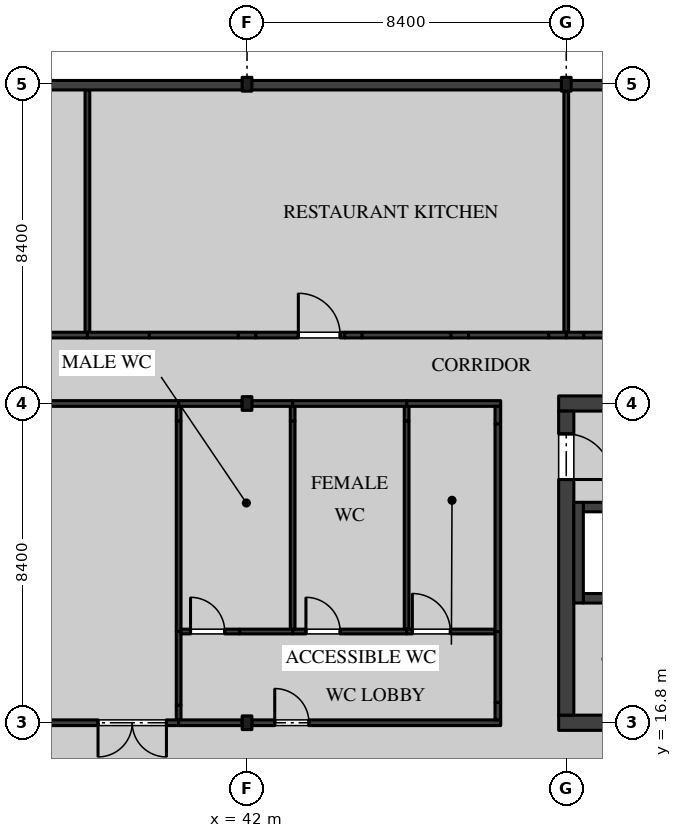
"""IFC4 building model, lengths in metres.
Left out: names, types, materials, properties, quantities, classifications, styles, units other than length and angle.
Written with IfcOpenShell. Run it as: python <this file> out.ifc"""

import sys

from ifc_helpers import new_model, si_unit, direction, frame, frame_2d, origin, origin_2d, place, context, subcontext, project, spatial, rectangle, i_section, extrude, element, fill, save


model = new_model("IFC4")
c1 = context("Model", 3, precision=1e-05, world=origin(), true_north=direction((0.0, 1.0)))
c2 = subcontext(c1, "Body", "Model", "MODEL_VIEW")
j1 = project(units=[si_unit("LENGTHUNIT", "METRE"), si_unit("PLANEANGLEUNIT", "RADIAN")], contexts=[c1])
p1 = place(None, origin())
s1 = spatial("IfcSite", under=j1, at=p1, CompositionType="ELEMENT")
p2 = place(p1, origin())
s2 = spatial("IfcBuilding", under=s1, at=p2, CompositionType="ELEMENT")
p3 = place(p2, frame((0.0, 0.0, 14.4)))
s3 = spatial("IfcBuildingStorey", under=s2, at=p3, CompositionType="ELEMENT", Elevation=14.4)
for number, where, z_axis, x_axis in (
    (1, (42.0, 16.8, 0.0), (0.0, 0.0, 1.0), (1.0, 0.0, 0.0)),
    (2, (42.0, 25.2, 0.0), (0.0, 0.0, 1.0), (1.0, 0.0, 0.0)),
):
    element("IfcColumn", number, at=place(p3, frame(where, z_axis=z_axis, x_axis=x_axis)), inside=s3, PredefinedType="COLUMN", context=c2, shape_type="SweptSolid", body=[
        extrude(i_section(OverallWidth=0.257, OverallDepth=0.361, WebThickness=0.011, FlangeThickness=0.02, FilletRadius=0.015, at=origin_2d()), origin(), (0.0, 0.0, 1.0), 4.37),
    ])
for number, where, z_axis, x_axis in (
    (3, (42.0, 33.6, 0.0), (0.0, 0.0, 1.0), (1.0, 0.0, 0.0)),
    (4, (50.4, 33.6, 0.0), (0.0, 0.0, 1.0), (1.0, 0.0, 0.0)),
):
    element("IfcColumn", number, at=place(p3, frame(where, z_axis=z_axis, x_axis=x_axis)), inside=s3, PredefinedType="COLUMN", context=c2, shape_type="SweptSolid", body=[
        extrude(i_section(OverallWidth=0.257, OverallDepth=0.363, WebThickness=0.013, FlangeThickness=0.022, FilletRadius=0.015, at=origin_2d()), origin(), (0.0, 0.0, 1.0), 4.37),
    ])
for number, where, z_axis, x_axis in (
    (5, (50.2, 16.8, 0.0), (0.0, 0.0, 1.0), (1.0, 0.0, 0.0)),
    (6, (50.2, 25.2, 0.0), (0.0, 0.0, 1.0), (1.0, 0.0, 0.0)),
):
    element("IfcWall", number, at=place(p3, frame(where, z_axis=z_axis, x_axis=x_axis)), inside=s3, PredefinedType="SHEAR", context=c2, shape_type="SweptSolid", body=[
        extrude(rectangle(XDim=8.8, YDim=0.4, at=frame_2d((4.4, 0.0))), origin(), (0.0, 0.0, 1.0), 4.37),
    ])
p4 = place(p3, frame((50.4, 17.0, 0.0), z_axis=(0.0, 0.0, 1.0), x_axis=(0.0, 1.0, 0.0)))
e7 = element("IfcWall", 7, at=p4, inside=s3, PredefinedType="SHEAR", context=c2, shape_type="SweptSolid", body=[
    extrude(rectangle(XDim=8.0, YDim=0.4, at=frame_2d((4.0, 0.0))), origin(), (0.0, 0.0, 1.0), 4.37),
])
p5 = place(p4, frame((6.2, 0.0, 0.0)))
e8 = element("IfcOpeningElement", 8, at=p5, cuts=e7, PredefinedType="OPENING", context=c2, shape_type="SweptSolid", body=[
    extrude(rectangle(XDim=1.2, YDim=2.1, at=frame_2d((0.6, 1.05))), frame((0.0, 0.21, 0.0), z_axis=(0.0, -1.0, 0.0), x_axis=(1.0, 0.0, 0.0)), (0.0, 0.0, 1.0), 0.42),
])
for number, where, z_axis, x_axis in (
    (9, (50.85, 22.475, 0.0), (0.0, 0.0, 1.0), (1.0, 0.0, 0.0)),
    (10, (50.85, 20.075, 0.0), (0.0, 0.0, 1.0), (1.0, 0.0, 0.0)),
):
    element("IfcWall", number, at=place(p3, frame(where, z_axis=z_axis, x_axis=x_axis)), inside=s3, PredefinedType="SOLIDWALL", context=c2, shape_type="SweptSolid", body=[
        extrude(rectangle(XDim=2.3, YDim=0.25, at=frame_2d((1.15, 0.0))), origin(), (0.0, 0.0, 1.0), 4.37),
    ])
p6 = place(p3, frame((50.725, 19.95, 0.0), z_axis=(0.0, 0.0, 1.0), x_axis=(0.0, 1.0, 0.0)))
e11 = element("IfcWall", 11, at=p6, inside=s3, PredefinedType="SOLIDWALL", context=c2, shape_type="SweptSolid", body=[
    extrude(rectangle(XDim=2.65, YDim=0.25, at=frame_2d((1.325, 0.0))), origin(), (0.0, 0.0, 1.0), 4.37),
])
p7 = place(p3, frame((40.2, 16.875, 0.0), z_axis=(0.0, 0.0, 1.0), x_axis=(0.0, 1.0, 0.0)))
e12 = element("IfcWall", 12, at=p7, inside=s3, PredefinedType="PARTITIONING", context=c2, shape_type="SweptSolid", body=[
    extrude(rectangle(XDim=0.385, YDim=0.125, at=frame_2d((0.192, 0.0))), origin(), (0.0, 0.0, 1.0), 3.743),
])
p8 = place(p3, frame((40.2, 17.26, 0.0), z_axis=(0.0, 0.0, 1.0), x_axis=(0.0, 1.0, 0.0)))
e13 = element("IfcWall", 13, at=p8, inside=s3, PredefinedType="PARTITIONING", context=c2, shape_type="SweptSolid", body=[
    extrude(rectangle(XDim=1.94, YDim=0.125, at=frame_2d((0.97, 0.0))), origin(), (0.0, 0.0, 1.0), 4.37),
])
p9 = place(p3, frame((40.2, 19.2, 0.0), z_axis=(0.0, 0.0, 1.0), x_axis=(0.0, 1.0, 0.0)))
e14 = element("IfcWall", 14, at=p9, inside=s3, PredefinedType="PARTITIONING", context=c2, shape_type="SweptSolid", body=[
    extrude(rectangle(XDim=5.54, YDim=0.125, at=frame_2d((2.77, 0.0))), origin(), (0.0, 0.0, 1.0), 4.37),
])
p10 = place(p3, frame((40.2, 24.74, 0.0), z_axis=(0.0, 0.0, 1.0), x_axis=(0.0, 1.0, 0.0)))
e15 = element("IfcWall", 15, at=p10, inside=s3, PredefinedType="PARTITIONING", context=c2, shape_type="SweptSolid", body=[
    extrude(rectangle(XDim=0.385, YDim=0.125, at=frame_2d((0.192, 0.0))), origin(), (0.0, 0.0, 1.0), 3.743),
])
p11 = place(p3, frame((33.729, 16.8, 0.0), z_axis=(0.0, 0.0, 1.0), x_axis=(1.0, 0.0, 0.0)))
e16 = element("IfcWall", 16, at=p11, inside=s3, PredefinedType="PARTITIONING", context=c2, shape_type="SweptSolid", body=[
    extrude(rectangle(XDim=6.471, YDim=0.15, at=frame_2d((3.235, 0.0))), origin(), (0.0, 0.0, 1.0), 3.743),
])
p12 = place(p11, frame((4.35, 0.0, 0.0)))
e17 = element("IfcOpeningElement", 17, at=p12, cuts=e16, PredefinedType="OPENING", context=c2, shape_type="SweptSolid", body=[
    extrude(rectangle(XDim=1.8, YDim=2.4, at=frame_2d((0.9, 1.2))), frame((0.0, 0.085, 0.0), z_axis=(0.0, -1.0, 0.0), x_axis=(1.0, 0.0, 0.0)), (0.0, 0.0, 1.0), 0.17),
])
p13 = place(p3, frame((33.729, 25.2, 0.0), z_axis=(0.0, 0.0, 1.0), x_axis=(1.0, 0.0, 0.0)))
e18 = element("IfcWall", 18, at=p13, inside=s3, PredefinedType="PARTITIONING", context=c2, shape_type="SweptSolid", body=[
    extrude(rectangle(XDim=6.471, YDim=0.15, at=frame_2d((3.235, 0.0))), origin(), (0.0, 0.0, 1.0), 3.743),
])
p14 = place(p3, frame((46.2, 19.262, 0.0), z_axis=(0.0, 0.0, 1.0), x_axis=(0.0, 1.0, 0.0)))
e19 = element("IfcWall", 19, at=p14, inside=s3, PredefinedType="PARTITIONING", context=c2, shape_type="SweptSolid", body=[
    extrude(rectangle(XDim=5.478, YDim=0.125, at=frame_2d((2.739, 0.0))), origin(), (0.0, 0.0, 1.0), 4.37),
])
p15 = place(p3, frame((46.2, 24.74, 0.0), z_axis=(0.0, 0.0, 1.0), x_axis=(0.0, 1.0, 0.0)))
e20 = element("IfcWall", 20, at=p15, inside=s3, PredefinedType="PARTITIONING", context=c2, shape_type="SweptSolid", body=[
    extrude(rectangle(XDim=0.385, YDim=0.125, at=frame_2d((0.192, 0.0))), origin(), (0.0, 0.0, 1.0), 3.743),
])
p16 = place(p3, frame((46.2, 19.2, 0.0), z_axis=(0.0, 0.0, 1.0), x_axis=(1.0, 0.0, 0.0)))
e21 = element("IfcWall", 21, at=p16, inside=s3, PredefinedType="PARTITIONING", context=c2, shape_type="SweptSolid", body=[
    extrude(rectangle(XDim=2.325, YDim=0.125, at=frame_2d((1.163, 0.0))), origin(), (0.0, 0.0, 1.0), 3.941),
])
p17 = place(p16, frame((0.15, 0.0, 0.0)))
e22 = element("IfcOpeningElement", 22, at=p17, cuts=e21, PredefinedType="OPENING", context=c2, shape_type="SweptSolid", body=[
    extrude(rectangle(XDim=1.0, YDim=2.1, at=frame_2d((0.5, 1.05))), frame((0.0, 0.073, 0.0), z_axis=(0.0, -1.0, 0.0), x_axis=(1.0, 0.0, 0.0)), (0.0, 0.0, 1.0), 0.145),
])
p18 = place(p3, frame((46.2, 25.2, 0.0), z_axis=(0.0, 0.0, 1.0), x_axis=(1.0, 0.0, 0.0)))
e23 = element("IfcWall", 23, at=p18, inside=s3, PredefinedType="PARTITIONING", context=c2, shape_type="SweptSolid", body=[
    extrude(rectangle(XDim=2.475, YDim=0.15, at=frame_2d((1.238, 0.0))), origin(), (0.0, 0.0, 1.0), 3.743),
])
p19 = place(p3, frame((48.6, 19.2, 0.0), z_axis=(0.0, 0.0, 1.0), x_axis=(0.0, 1.0, 0.0)))
e24 = element("IfcWall", 24, at=p19, inside=s3, PredefinedType="PARTITIONING", context=c2, shape_type="SweptSolid", body=[
    extrude(rectangle(XDim=5.465, YDim=0.15, at=frame_2d((2.732, 0.0))), origin(), (0.0, 0.0, 1.0), 4.37),
])
p20 = place(p3, frame((48.6, 24.665, 0.0), z_axis=(0.0, 0.0, 1.0), x_axis=(0.0, 1.0, 0.0)))
e25 = element("IfcWall", 25, at=p20, inside=s3, PredefinedType="PARTITIONING", context=c2, shape_type="SweptSolid", body=[
    extrude(rectangle(XDim=0.46, YDim=0.15, at=frame_2d((0.23, 0.0))), origin(), (0.0, 0.0, 1.0), 3.743),
])
p21 = place(p3, frame((43.2, 19.2, 0.0), z_axis=(0.0, 0.0, 1.0), x_axis=(1.0, 0.0, 0.0)))
e26 = element("IfcWall", 26, at=p21, inside=s3, PredefinedType="PARTITIONING", context=c2, shape_type="SweptSolid", body=[
    extrude(rectangle(XDim=3.0, YDim=0.125, at=frame_2d((1.5, 0.0))), origin(), (0.0, 0.0, 1.0), 3.941),
])
p22 = place(p21, frame((0.35, 0.0, 0.0)))
e27 = element("IfcOpeningElement", 27, at=p22, cuts=e26, PredefinedType="OPENING", context=c2, shape_type="SweptSolid", body=[
    extrude(rectangle(XDim=0.9, YDim=2.1, at=frame_2d((0.45, 1.05))), frame((0.0, 0.073, 0.0), z_axis=(0.0, -1.0, 0.0), x_axis=(1.0, 0.0, 0.0)), (0.0, 0.0, 1.0), 0.145),
])
p23 = place(p3, frame((43.2, 19.262, 0.0), z_axis=(0.0, 0.0, 1.0), x_axis=(0.0, 1.0, 0.0)))
e28 = element("IfcWall", 28, at=p23, inside=s3, PredefinedType="PARTITIONING", context=c2, shape_type="SweptSolid", body=[
    extrude(rectangle(XDim=5.478, YDim=0.125, at=frame_2d((2.739, 0.0))), origin(), (0.0, 0.0, 1.0), 4.37),
])
p24 = place(p3, frame((43.2, 24.74, 0.0), z_axis=(0.0, 0.0, 1.0), x_axis=(0.0, 1.0, 0.0)))
e29 = element("IfcWall", 29, at=p24, inside=s3, PredefinedType="PARTITIONING", context=c2, shape_type="SweptSolid", body=[
    extrude(rectangle(XDim=0.385, YDim=0.125, at=frame_2d((0.192, 0.0))), origin(), (0.0, 0.0, 1.0), 3.743),
])
p25 = place(p3, frame((43.2, 25.2, 0.0), z_axis=(0.0, 0.0, 1.0), x_axis=(1.0, 0.0, 0.0)))
e30 = element("IfcWall", 30, at=p25, inside=s3, PredefinedType="PARTITIONING", context=c2, shape_type="SweptSolid", body=[
    extrude(rectangle(XDim=3.0, YDim=0.15, at=frame_2d((1.5, 0.0))), origin(), (0.0, 0.0, 1.0), 3.743),
])
p26 = place(p3, frame((40.263, 19.2, 0.0), z_axis=(0.0, 0.0, 1.0), x_axis=(1.0, 0.0, 0.0)))
e31 = element("IfcWall", 31, at=p26, inside=s3, PredefinedType="PARTITIONING", context=c2, shape_type="SweptSolid", body=[
    extrude(rectangle(XDim=1.544, YDim=0.125, at=frame_2d((0.772, 0.0))), origin(), (0.0, 0.0, 1.0), 4.37),
])
p27 = place(p26, frame((0.25, 0.0, 0.0)))
e32 = element("IfcOpeningElement", 32, at=p27, cuts=e31, PredefinedType="OPENING", context=c2, shape_type="SweptSolid", body=[
    extrude(rectangle(XDim=0.9, YDim=2.1, at=frame_2d((0.45, 1.05))), frame((0.0, 0.073, 0.0), z_axis=(0.0, -1.0, 0.0), x_axis=(1.0, 0.0, 0.0)), (0.0, 0.0, 1.0), 0.145),
])
p28 = place(p3, frame((41.807, 19.2, 0.0), z_axis=(0.0, 0.0, 1.0), x_axis=(1.0, 0.0, 0.0)))
e33 = element("IfcWall", 33, at=p28, inside=s3, PredefinedType="PARTITIONING", context=c2, shape_type="SweptSolid", body=[
    extrude(rectangle(XDim=1.393, YDim=0.125, at=frame_2d((0.697, 0.0))), origin(), (0.0, 0.0, 1.0), 3.743),
])
p29 = place(p3, frame((40.2, 16.8, 0.0), z_axis=(0.0, 0.0, 1.0), x_axis=(1.0, 0.0, 0.0)))
e34 = element("IfcWall", 34, at=p29, inside=s3, PredefinedType="PARTITIONING", context=c2, shape_type="SweptSolid", body=[
    extrude(rectangle(XDim=1.671, YDim=0.15, at=frame_2d((0.835, 0.0))), origin(), (0.0, 0.0, 1.0), 3.743),
])
p30 = place(p3, frame((42.129, 16.8, 0.0), z_axis=(0.0, 0.0, 1.0), x_axis=(1.0, 0.0, 0.0)))
e35 = element("IfcWall", 35, at=p30, inside=s3, PredefinedType="PARTITIONING", context=c2, shape_type="SweptSolid", body=[
    extrude(rectangle(XDim=6.546, YDim=0.15, at=frame_2d((3.273, 0.0))), origin(), (0.0, 0.0, 1.0), 3.743),
])
p31 = place(p30, frame((0.6, 0.0, 0.0)))
e36 = element("IfcOpeningElement", 36, at=p31, cuts=e35, PredefinedType="OPENING", context=c2, shape_type="SweptSolid", body=[
    extrude(rectangle(XDim=0.9, YDim=2.1, at=frame_2d((0.45, 1.05))), frame((0.0, 0.085, 0.0), z_axis=(0.0, -1.0, 0.0), x_axis=(1.0, 0.0, 0.0)), (0.0, 0.0, 1.0), 0.17),
])
p32 = place(p3, frame((48.6, 16.875, 0.0), z_axis=(0.0, 0.0, 1.0), x_axis=(0.0, 1.0, 0.0)))
e37 = element("IfcWall", 37, at=p32, inside=s3, PredefinedType="PARTITIONING", context=c2, shape_type="SweptSolid", body=[
    extrude(rectangle(XDim=0.46, YDim=0.15, at=frame_2d((0.23, 0.0))), origin(), (0.0, 0.0, 1.0), 3.743),
])
p33 = place(p3, frame((48.6, 17.335, 0.0), z_axis=(0.0, 0.0, 1.0), x_axis=(0.0, 1.0, 0.0)))
e38 = element("IfcWall", 38, at=p33, inside=s3, PredefinedType="PARTITIONING", context=c2, shape_type="SweptSolid", body=[
    extrude(rectangle(XDim=1.865, YDim=0.15, at=frame_2d((0.933, 0.0))), origin(), (0.0, 0.0, 1.0), 4.37),
])
p34 = place(p3, frame((40.2, 25.2, 0.0), z_axis=(0.0, 0.0, 1.0), x_axis=(1.0, 0.0, 0.0)))
e39 = element("IfcWall", 39, at=p34, inside=s3, PredefinedType="PARTITIONING", context=c2, shape_type="SweptSolid", body=[
    extrude(rectangle(XDim=1.671, YDim=0.15, at=frame_2d((0.835, 0.0))), origin(), (0.0, 0.0, 1.0), 3.743),
])
p35 = place(p3, frame((42.129, 25.2, 0.0), z_axis=(0.0, 0.0, 1.0), x_axis=(1.0, 0.0, 0.0)))
e40 = element("IfcWall", 40, at=p35, inside=s3, PredefinedType="PARTITIONING", context=c2, shape_type="SweptSolid", body=[
    extrude(rectangle(XDim=1.071, YDim=0.15, at=frame_2d((0.536, 0.0))), origin(), (0.0, 0.0, 1.0), 3.743),
])
p36 = place(p3, frame((37.8, 27.075, 0.0), z_axis=(0.0, 0.0, 1.0), x_axis=(0.0, 1.0, 0.0)))
e41 = element("IfcWall", 41, at=p36, inside=s3, PredefinedType="PARTITIONING", context=c2, shape_type="SweptSolid", body=[
    extrude(rectangle(XDim=6.375, YDim=0.125, at=frame_2d((3.188, 0.0))), origin(), (0.0, 0.0, 1.0), 4.37),
])
p37 = place(p3, frame((36.17, 27.0, 0.0), z_axis=(0.0, 0.0, 1.0), x_axis=(1.0, 0.0, 0.0)))
e42 = element("IfcWall", 42, at=p37, inside=s3, PredefinedType="PARTITIONING", context=c2, shape_type="SweptSolid", body=[
    extrude(rectangle(XDim=1.63, YDim=0.15, at=frame_2d((0.815, 0.0))), origin(), (0.0, 0.0, 1.0), 3.941),
])
p38 = place(p3, frame((50.4, 27.075, 0.0), z_axis=(0.0, 0.0, 1.0), x_axis=(0.0, 1.0, 0.0)))
e43 = element("IfcWall", 43, at=p38, inside=s3, PredefinedType="PARTITIONING", context=c2, shape_type="SweptSolid", body=[
    extrude(rectangle(XDim=6.344, YDim=0.125, at=frame_2d((3.172, 0.0))), origin(), (0.0, 0.0, 1.0), 3.743),
])
p39 = place(p3, frame((50.4, 27.0, 0.0), z_axis=(0.0, 0.0, 1.0), x_axis=(1.0, 0.0, 0.0)))
e44 = element("IfcWall", 44, at=p39, inside=s3, PredefinedType="PARTITIONING", context=c2, shape_type="SweptSolid", body=[
    extrude(rectangle(XDim=0.46, YDim=0.15, at=frame_2d((0.23, 0.0))), origin(), (0.0, 0.0, 1.0), 3.743),
])
p40 = place(p3, frame((50.86, 27.0, 0.0), z_axis=(0.0, 0.0, 1.0), x_axis=(1.0, 0.0, 0.0)))
e45 = element("IfcWall", 45, at=p40, inside=s3, PredefinedType="PARTITIONING", context=c2, shape_type="SweptSolid", body=[
    extrude(rectangle(XDim=2.11, YDim=0.15, at=frame_2d((1.055, 0.0))), origin(), (0.0, 0.0, 1.0), 4.37),
])
p41 = place(p3, frame((37.8, 27.0, 0.0), z_axis=(0.0, 0.0, 1.0), x_axis=(1.0, 0.0, 0.0)))
e46 = element("IfcWall", 46, at=p41, inside=s3, PredefinedType="PARTITIONING", context=c2, shape_type="SweptSolid", body=[
    extrude(rectangle(XDim=1.63, YDim=0.15, at=frame_2d((0.815, 0.0))), origin(), (0.0, 0.0, 1.0), 3.941),
])
p42 = place(p3, frame((39.43, 27.0, 0.0), z_axis=(0.0, 0.0, 1.0), x_axis=(1.0, 0.0, 0.0)))
e47 = element("IfcWall", 47, at=p42, inside=s3, PredefinedType="PARTITIONING", context=c2, shape_type="SweptSolid", body=[
    extrude(rectangle(XDim=2.34, YDim=0.15, at=frame_2d((1.17, 0.0))), origin(), (0.0, 0.0, 1.0), 4.37),
])
p43 = place(p3, frame((41.77, 27.0, 0.0), z_axis=(0.0, 0.0, 1.0), x_axis=(1.0, 0.0, 0.0)))
e48 = element("IfcWall", 48, at=p43, inside=s3, PredefinedType="PARTITIONING", context=c2, shape_type="SweptSolid", body=[
    extrude(rectangle(XDim=0.46, YDim=0.15, at=frame_2d((0.23, 0.0))), origin(), (0.0, 0.0, 1.0), 3.743),
])
p44 = place(p3, frame((42.23, 27.0, 0.0), z_axis=(0.0, 0.0, 1.0), x_axis=(1.0, 0.0, 0.0)))
e49 = element("IfcWall", 49, at=p44, inside=s3, PredefinedType="PARTITIONING", context=c2, shape_type="SweptSolid", body=[
    extrude(rectangle(XDim=2.34, YDim=0.15, at=frame_2d((1.17, 0.0))), origin(), (0.0, 0.0, 1.0), 4.37),
])
p45 = place(p44, frame((1.12, 0.0, 0.0)))
e50 = element("IfcOpeningElement", 50, at=p45, cuts=e49, PredefinedType="OPENING", context=c2, shape_type="SweptSolid", body=[
    extrude(rectangle(XDim=1.1, YDim=2.1, at=frame_2d((0.55, 1.05))), frame((0.0, 0.085, 0.0), z_axis=(0.0, -1.0, 0.0), x_axis=(1.0, 0.0, 0.0)), (0.0, 0.0, 1.0), 0.17),
])
p46 = place(p3, frame((44.57, 27.0, 0.0), z_axis=(0.0, 0.0, 1.0), x_axis=(1.0, 0.0, 0.0)))
e51 = element("IfcWall", 51, at=p46, inside=s3, PredefinedType="PARTITIONING", context=c2, shape_type="SweptSolid", body=[
    extrude(rectangle(XDim=0.46, YDim=0.15, at=frame_2d((0.23, 0.0))), origin(), (0.0, 0.0, 1.0), 3.941),
])
p47 = place(p3, frame((45.03, 27.0, 0.0), z_axis=(0.0, 0.0, 1.0), x_axis=(1.0, 0.0, 0.0)))
e52 = element("IfcWall", 52, at=p47, inside=s3, PredefinedType="PARTITIONING", context=c2, shape_type="SweptSolid", body=[
    extrude(rectangle(XDim=2.34, YDim=0.15, at=frame_2d((1.17, 0.0))), origin(), (0.0, 0.0, 1.0), 4.37),
])
p48 = place(p3, frame((47.37, 27.0, 0.0), z_axis=(0.0, 0.0, 1.0), x_axis=(1.0, 0.0, 0.0)))
e53 = element("IfcWall", 53, at=p48, inside=s3, PredefinedType="PARTITIONING", context=c2, shape_type="SweptSolid", body=[
    extrude(rectangle(XDim=0.46, YDim=0.15, at=frame_2d((0.23, 0.0))), origin(), (0.0, 0.0, 1.0), 3.941),
])
p49 = place(p3, frame((47.83, 27.0, 0.0), z_axis=(0.0, 0.0, 1.0), x_axis=(1.0, 0.0, 0.0)))
e54 = element("IfcWall", 54, at=p49, inside=s3, PredefinedType="PARTITIONING", context=c2, shape_type="SweptSolid", body=[
    extrude(rectangle(XDim=2.11, YDim=0.15, at=frame_2d((1.055, 0.0))), origin(), (0.0, 0.0, 1.0), 4.37),
])
p50 = place(p3, frame((49.94, 27.0, 0.0), z_axis=(0.0, 0.0, 1.0), x_axis=(1.0, 0.0, 0.0)))
e55 = element("IfcWall", 55, at=p50, inside=s3, PredefinedType="PARTITIONING", context=c2, shape_type="SweptSolid", body=[
    extrude(rectangle(XDim=0.46, YDim=0.15, at=frame_2d((0.23, 0.0))), origin(), (0.0, 0.0, 1.0), 3.743),
])
p51 = place(p3, frame((58.795, 33.575, 0.0), z_axis=(0.0, 0.0, 1.0), x_axis=(-1.0, 0.0, 0.0)))
e56 = element("IfcWall", 56, at=p51, inside=s3, PredefinedType="SOLIDWALL", context=c2, shape_type="SweptSolid", body=[
    extrude(rectangle(XDim=8.391, YDim=0.25, at=frame_2d((4.195, 0.0))), origin(), (0.0, 0.0, 1.0), 3.819),
])
p52 = place(p3, frame((50.396, 33.575, 0.0), z_axis=(0.0, 0.0, 1.0), x_axis=(-1.0, 0.0, 0.0)))
e57 = element("IfcWall", 57, at=p52, inside=s3, PredefinedType="SOLIDWALL", context=c2, shape_type="SweptSolid", body=[
    extrude(rectangle(XDim=8.393, YDim=0.25, at=frame_2d((4.196, 0.0))), origin(), (0.0, 0.0, 1.0), 3.743),
])
p53 = place(p3, frame((41.996, 33.575, 0.0), z_axis=(0.0, 0.0, 1.0), x_axis=(-1.0, 0.0, 0.0)))
e58 = element("IfcWall", 58, at=p53, inside=s3, PredefinedType="SOLIDWALL", context=c2, shape_type="SweptSolid", body=[
    extrude(rectangle(XDim=8.393, YDim=0.25, at=frame_2d((4.196, 0.0))), origin(), (0.0, 0.0, 1.0), 3.743),
])
p54 = place(p5, frame((1.2, 0.0, 0.0), z_axis=(0.0, 0.0, 1.0), x_axis=(-1.0, 0.0, 0.0)))
e59 = element("IfcDoor", 59, at=p54, inside=s3, OperationType="SINGLE_SWING_LEFT", PredefinedType="DOOR", context=c2, shape_type="SweptSolid", body=[
    extrude(rectangle(XDim=1.2, YDim=2.1, at=frame_2d((0.6, 1.05))), frame((0.0, 0.035, 0.0), z_axis=(0.0, -1.0, 0.0), x_axis=(1.0, 0.0, 0.0)), (0.0, 0.0, 1.0), 0.07),
])
fill(e8, e59)
p55 = place(p12, frame((1.8, 0.0, 0.0), z_axis=(0.0, 0.0, 1.0), x_axis=(-1.0, 0.0, 0.0)))
e60 = element("IfcDoor", 60, at=p55, inside=s3, OperationType="DOUBLE_DOOR_SINGLE_SWING", PredefinedType="DOOR", context=c2, shape_type="SweptSolid", body=[
    extrude(rectangle(XDim=1.8, YDim=2.4, at=frame_2d((0.9, 1.2))), frame((0.0, 0.025, 0.0), z_axis=(0.0, -1.0, 0.0), x_axis=(1.0, 0.0, 0.0)), (0.0, 0.0, 1.0), 0.05),
])
fill(e17, e60)
p56 = place(p17, origin())
e61 = element("IfcDoor", 61, at=p56, inside=s3, OperationType="SINGLE_SWING_RIGHT", PredefinedType="DOOR", context=c2, shape_type="SweptSolid", body=[
    extrude(rectangle(XDim=1.0, YDim=2.1, at=frame_2d((0.5, 1.05))), frame((0.0, 0.02, 0.0), z_axis=(0.0, -1.0, 0.0), x_axis=(1.0, 0.0, 0.0)), (0.0, 0.0, 1.0), 0.04),
])
fill(e22, e61)
p57 = place(p22, origin())
e62 = element("IfcDoor", 62, at=p57, inside=s3, OperationType="SINGLE_SWING_RIGHT", PredefinedType="DOOR", context=c2, shape_type="SweptSolid", body=[
    extrude(rectangle(XDim=0.9, YDim=2.1, at=frame_2d((0.45, 1.05))), frame((0.0, 0.02, 0.0), z_axis=(0.0, -1.0, 0.0), x_axis=(1.0, 0.0, 0.0)), (0.0, 0.0, 1.0), 0.04),
])
fill(e27, e62)
p58 = place(p31, origin())
e63 = element("IfcDoor", 63, at=p58, inside=s3, OperationType="SINGLE_SWING_RIGHT", PredefinedType="DOOR", context=c2, shape_type="SweptSolid", body=[
    extrude(rectangle(XDim=0.9, YDim=2.1, at=frame_2d((0.45, 1.05))), frame((0.0, 0.025, 0.0), z_axis=(0.0, -1.0, 0.0), x_axis=(1.0, 0.0, 0.0)), (0.0, 0.0, 1.0), 0.05),
])
fill(e36, e63)
p59 = place(p27, origin())
e64 = element("IfcDoor", 64, at=p59, inside=s3, OperationType="SINGLE_SWING_RIGHT", PredefinedType="DOOR", context=c2, shape_type="SweptSolid", body=[
    extrude(rectangle(XDim=0.9, YDim=2.1, at=frame_2d((0.45, 1.05))), frame((0.0, 0.02, 0.0), z_axis=(0.0, -1.0, 0.0), x_axis=(1.0, 0.0, 0.0)), (0.0, 0.0, 1.0), 0.04),
])
fill(e32, e64)
p60 = place(p45, origin())
e65 = element("IfcDoor", 65, at=p60, inside=s3, OperationType="SINGLE_SWING_RIGHT", PredefinedType="DOOR", context=c2, shape_type="SweptSolid", body=[
    extrude(rectangle(XDim=1.1, YDim=2.1, at=frame_2d((0.55, 1.05))), frame((0.0, 0.025, 0.0), z_axis=(0.0, -1.0, 0.0), x_axis=(1.0, 0.0, 0.0)), (0.0, 0.0, 1.0), 0.05),
])
fill(e50, e65)
save(model, sys.argv[1])
